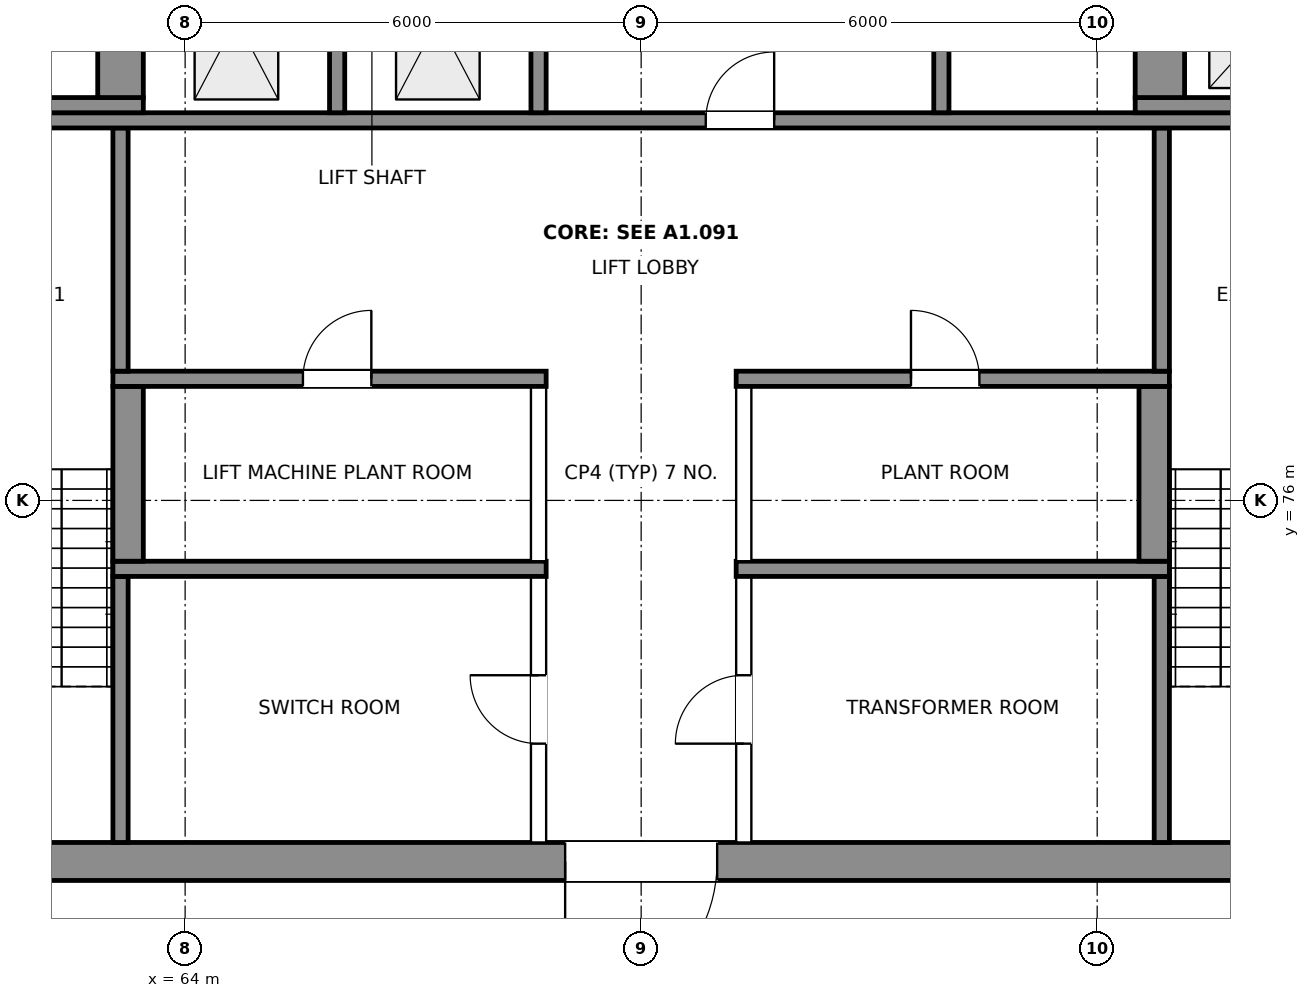
"""IFC4 building model, lengths in metres.
Left out: names, types, materials, properties, quantities, classifications, styles, units other than length and angle.
Written with IfcOpenShell. Run it as: python <this file> out.ifc"""

import sys

from ifc_helpers import new_model, si_unit, direction, frame, frame_2d, origin, place, context, subcontext, project, spatial, rectangle, extrude, element, fill, save


model = new_model("IFC4")
c1 = context("Model", 3, precision=1e-05, world=origin(), true_north=direction((0.0, 1.0)))
c2 = subcontext(c1, "Body", "Model", "MODEL_VIEW")
j1 = project(units=[si_unit("LENGTHUNIT", "METRE"), si_unit("PLANEANGLEUNIT", "RADIAN")], contexts=[c1])
p1 = place(None, origin())
s1 = spatial("IfcSite", under=j1, at=p1, CompositionType="ELEMENT")
p2 = place(p1, origin())
s2 = spatial("IfcBuilding", under=s1, at=p2, CompositionType="ELEMENT")
p3 = place(p2, frame((0.0, 0.0, 328.7)))
s3 = spatial("IfcBuildingStorey", under=s2, at=p3, CompositionType="ELEMENT", Elevation=328.7)
p4 = place(p3, frame((59.0, 71.25, 0.0), z_axis=(0.0, 0.0, 1.0), x_axis=(1.0, 0.0, 0.0)))
e1 = element("IfcWall", 1, at=p4, inside=s3, PredefinedType="SHEAR", context=c2, shape_type="SweptSolid", body=[
    extrude(rectangle(XDim=22.0, YDim=0.5, at=frame_2d((11.0, 0.0))), origin(), (0.0, 0.0, 1.0), 4.5),
])
p5 = place(p4, frame((2.025, 0.0, 0.0)))
e2 = element("IfcOpeningElement", 2, at=p5, cuts=e1, PredefinedType="OPENING", context=c2, shape_type="SweptSolid", body=[
    extrude(rectangle(XDim=1.2, YDim=2.1, at=frame_2d((0.6, 1.05))), frame((0.0, 0.26, 0.0), z_axis=(0.0, -1.0, 0.0), x_axis=(1.0, 0.0, 0.0)), (0.0, 0.0, 1.0), 0.52),
])
p6 = place(p4, frame((18.775, 0.0, 0.0)))
e3 = element("IfcOpeningElement", 3, at=p6, cuts=e1, PredefinedType="OPENING", context=c2, shape_type="SweptSolid", body=[
    extrude(rectangle(XDim=1.2, YDim=2.1, at=frame_2d((0.6, 1.05))), frame((0.0, 0.26, 0.0), z_axis=(0.0, -1.0, 0.0), x_axis=(1.0, 0.0, 0.0)), (0.0, 0.0, 1.0), 0.52),
])
p7 = place(p4, frame((10.0, 0.0, 0.0)))
e4 = element("IfcOpeningElement", 4, at=p7, cuts=e1, PredefinedType="OPENING", context=c2, shape_type="SweptSolid", body=[
    extrude(rectangle(XDim=2.0, YDim=2.1, at=frame_2d((1.0, 1.05))), frame((0.0, 0.26, 0.0), z_axis=(0.0, -1.0, 0.0), x_axis=(1.0, 0.0, 0.0)), (0.0, 0.0, 1.0), 0.52),
])
p8 = place(p3, frame((63.15, 71.5, 0.0), z_axis=(0.0, 0.0, 1.0), x_axis=(0.0, 1.0, 0.0)))
e5 = element("IfcWall", 5, at=p8, inside=s3, PredefinedType="SHEAR", context=c2, shape_type="SweptSolid", body=[
    extrude(rectangle(XDim=3.5, YDim=0.2, at=frame_2d((1.75, 0.0))), origin(), (0.0, 0.0, 1.0), 4.5),
])
p9 = place(p3, frame((68.65, 71.5, 0.0), z_axis=(0.0, 0.0, 1.0), x_axis=(0.0, 1.0, 0.0)))
e6 = element("IfcWall", 6, at=p9, inside=s3, PredefinedType="PARTITIONING", context=c2, shape_type="SweptSolid", body=[
    extrude(rectangle(XDim=3.5, YDim=0.2, at=frame_2d((1.75, 0.0))), origin(), (0.0, 0.0, 1.0), 4.2),
])
p10 = place(p9, frame((1.3, 0.0, 0.0)))
e7 = element("IfcOpeningElement", 7, at=p10, cuts=e6, PredefinedType="OPENING", context=c2, shape_type="SweptSolid", body=[
    extrude(rectangle(XDim=0.9, YDim=2.1, at=frame_2d((0.45, 1.05))), frame((0.0, 0.11, 0.0), z_axis=(0.0, -1.0, 0.0), x_axis=(1.0, 0.0, 0.0)), (0.0, 0.0, 1.0), 0.22),
])
p11 = place(p3, frame((71.35, 71.5, 0.0), z_axis=(0.0, 0.0, 1.0), x_axis=(0.0, 1.0, 0.0)))
e8 = element("IfcWall", 8, at=p11, inside=s3, PredefinedType="PARTITIONING", context=c2, shape_type="SweptSolid", body=[
    extrude(rectangle(XDim=3.5, YDim=0.2, at=frame_2d((1.75, 0.0))), origin(), (0.0, 0.0, 1.0), 4.2),
])
p12 = place(p11, frame((1.3, 0.0, 0.0)))
e9 = element("IfcOpeningElement", 9, at=p12, cuts=e8, PredefinedType="OPENING", context=c2, shape_type="SweptSolid", body=[
    extrude(rectangle(XDim=0.9, YDim=2.1, at=frame_2d((0.45, 1.05))), frame((0.0, 0.11, 0.0), z_axis=(0.0, -1.0, 0.0), x_axis=(1.0, 0.0, 0.0)), (0.0, 0.0, 1.0), 0.22),
])
p13 = place(p3, frame((76.85, 71.5, 0.0), z_axis=(0.0, 0.0, 1.0), x_axis=(0.0, 1.0, 0.0)))
e10 = element("IfcWall", 10, at=p13, inside=s3, PredefinedType="SHEAR", context=c2, shape_type="SweptSolid", body=[
    extrude(rectangle(XDim=3.5, YDim=0.2, at=frame_2d((1.75, 0.0))), origin(), (0.0, 0.0, 1.0), 4.5),
])
for number, where, z_axis, x_axis in (
    (11, (63.05, 75.1, 0.0), (0.0, 0.0, 1.0), (1.0, 0.0, 0.0)),
    (12, (71.25, 75.1, 0.0), (0.0, 0.0, 1.0), (1.0, 0.0, 0.0)),
):
    element("IfcWall", number, at=place(p3, frame(where, z_axis=z_axis, x_axis=x_axis)), inside=s3, PredefinedType="SHEAR", context=c2, shape_type="SweptSolid", body=[
        extrude(rectangle(XDim=5.7, YDim=0.2, at=frame_2d((2.85, 0.0))), origin(), (0.0, 0.0, 1.0), 4.5),
    ])
p14 = place(p3, frame((63.25, 75.2, 0.0), z_axis=(0.0, 0.0, 1.0), x_axis=(0.0, 1.0, 0.0)))
e13 = element("IfcWall", 13, at=p14, inside=s3, PredefinedType="SHEAR", context=c2, shape_type="SweptSolid", body=[
    extrude(rectangle(XDim=2.3, YDim=0.4, at=frame_2d((1.15, 0.0))), origin(), (0.0, 0.0, 1.0), 4.5),
])
for number, where, z_axis, x_axis in (
    (14, (68.65, 75.2, 0.0), (0.0, 0.0, 1.0), (0.0, 1.0, 0.0)),
    (15, (71.35, 75.2, 0.0), (0.0, 0.0, 1.0), (0.0, 1.0, 0.0)),
):
    element("IfcWall", number, at=place(p3, frame(where, z_axis=z_axis, x_axis=x_axis)), inside=s3, PredefinedType="PARTITIONING", context=c2, shape_type="SweptSolid", body=[
        extrude(rectangle(XDim=2.3, YDim=0.2, at=frame_2d((1.15, 0.0))), origin(), (0.0, 0.0, 1.0), 4.2),
    ])
p15 = place(p3, frame((76.75, 75.2, 0.0), z_axis=(0.0, 0.0, 1.0), x_axis=(0.0, 1.0, 0.0)))
e16 = element("IfcWall", 16, at=p15, inside=s3, PredefinedType="SHEAR", context=c2, shape_type="SweptSolid", body=[
    extrude(rectangle(XDim=2.3, YDim=0.4, at=frame_2d((1.15, 0.0))), origin(), (0.0, 0.0, 1.0), 4.5),
])
p16 = place(p3, frame((63.05, 77.6, 0.0), z_axis=(0.0, 0.0, 1.0), x_axis=(1.0, 0.0, 0.0)))
e17 = element("IfcWall", 17, at=p16, inside=s3, PredefinedType="SHEAR", context=c2, shape_type="SweptSolid", body=[
    extrude(rectangle(XDim=5.7, YDim=0.2, at=frame_2d((2.85, 0.0))), origin(), (0.0, 0.0, 1.0), 4.5),
])
p17 = place(p16, frame((2.5, 0.0, 0.0)))
e18 = element("IfcOpeningElement", 18, at=p17, cuts=e17, PredefinedType="OPENING", context=c2, shape_type="SweptSolid", body=[
    extrude(rectangle(XDim=0.9, YDim=2.1, at=frame_2d((0.45, 1.05))), frame((0.0, 0.11, 0.0), z_axis=(0.0, -1.0, 0.0), x_axis=(1.0, 0.0, 0.0)), (0.0, 0.0, 1.0), 0.22),
])
p18 = place(p3, frame((71.25, 77.6, 0.0), z_axis=(0.0, 0.0, 1.0), x_axis=(1.0, 0.0, 0.0)))
e19 = element("IfcWall", 19, at=p18, inside=s3, PredefinedType="SHEAR", context=c2, shape_type="SweptSolid", body=[
    extrude(rectangle(XDim=5.7, YDim=0.2, at=frame_2d((2.85, 0.0))), origin(), (0.0, 0.0, 1.0), 4.5),
])
p19 = place(p18, frame((2.3, 0.0, 0.0)))
e20 = element("IfcOpeningElement", 20, at=p19, cuts=e19, PredefinedType="OPENING", context=c2, shape_type="SweptSolid", body=[
    extrude(rectangle(XDim=0.9, YDim=2.1, at=frame_2d((0.45, 1.05))), frame((0.0, 0.11, 0.0), z_axis=(0.0, -1.0, 0.0), x_axis=(1.0, 0.0, 0.0)), (0.0, 0.0, 1.0), 0.22),
])
for number, where, z_axis, x_axis in (
    (21, (63.15, 77.7, 0.0), (0.0, 0.0, 1.0), (0.0, 1.0, 0.0)),
    (22, (76.85, 77.7, 0.0), (0.0, 0.0, 1.0), (0.0, 1.0, 0.0)),
):
    element("IfcWall", number, at=place(p3, frame(where, z_axis=z_axis, x_axis=x_axis)), inside=s3, PredefinedType="SHEAR", context=c2, shape_type="SweptSolid", body=[
        extrude(rectangle(XDim=3.2, YDim=0.2, at=frame_2d((1.6, 0.0))), origin(), (0.0, 0.0, 1.0), 4.5),
    ])
p20 = place(p3, frame((59.0, 81.0, 0.0), z_axis=(0.0, 0.0, 1.0), x_axis=(1.0, 0.0, 0.0)))
e23 = element("IfcWall", 23, at=p20, inside=s3, PredefinedType="SHEAR", context=c2, shape_type="SweptSolid", body=[
    extrude(rectangle(XDim=22.0, YDim=0.2, at=frame_2d((11.0, 0.0))), origin(), (0.0, 0.0, 1.0), 4.5),
])
p21 = place(p20, frame((11.85, 0.0, 0.0)))
e24 = element("IfcOpeningElement", 24, at=p21, cuts=e23, PredefinedType="OPENING", context=c2, shape_type="SweptSolid", body=[
    extrude(rectangle(XDim=0.9, YDim=2.1, at=frame_2d((0.45, 1.05))), frame((0.0, 0.11, 0.0), z_axis=(0.0, -1.0, 0.0), x_axis=(1.0, 0.0, 0.0)), (0.0, 0.0, 1.0), 0.22),
])
p22 = place(p3, frame((59.0, 81.2, 0.0), z_axis=(0.0, 0.0, 1.0), x_axis=(1.0, 0.0, 0.0)))
e25 = element("IfcWall", 25, at=p22, inside=s3, PredefinedType="SHEAR", context=c2, shape_type="SweptSolid", body=[
    extrude(rectangle(XDim=4.45, YDim=0.2, at=frame_2d((2.225, 0.0))), origin(), (0.0, 0.0, 1.0), 4.5),
])
for number, where, z_axis, x_axis in (
    (26, (66.0, 81.1, 0.0), (0.0, 0.0, 1.0), (0.0, 1.0, 0.0)),
    (27, (68.65, 81.1, 0.0), (0.0, 0.0, 1.0), (0.0, 1.0, 0.0)),
    (28, (73.95, 81.1, 0.0), (0.0, 0.0, 1.0), (0.0, 1.0, 0.0)),
):
    element("IfcWall", number, at=place(p3, frame(where, z_axis=z_axis, x_axis=x_axis)), inside=s3, PredefinedType="SHEAR", context=c2, shape_type="SweptSolid", body=[
        extrude(rectangle(XDim=2.45, YDim=0.2, at=frame_2d((1.225, 0.0))), origin(), (0.0, 0.0, 1.0), 4.5),
    ])
p23 = place(p3, frame((76.5, 81.2, 0.0), z_axis=(0.0, 0.0, 1.0), x_axis=(1.0, 0.0, 0.0)))
e29 = element("IfcWall", 29, at=p23, inside=s3, PredefinedType="SHEAR", context=c2, shape_type="SweptSolid", body=[
    extrude(rectangle(XDim=4.5, YDim=0.2, at=frame_2d((2.25, 0.0))), origin(), (0.0, 0.0, 1.0), 4.5),
])
p24 = place(p3, frame((63.15, 81.3, 0.0), z_axis=(0.0, 0.0, 1.0), x_axis=(0.0, 1.0, 0.0)))
e30 = element("IfcWall", 30, at=p24, inside=s3, PredefinedType="SHEAR", context=c2, shape_type="SweptSolid", body=[
    extrude(rectangle(XDim=2.25, YDim=0.6, at=frame_2d((1.125, 0.0))), origin(), (0.0, 0.0, 1.0), 4.5),
])
p25 = place(p3, frame((76.825, 81.3, 0.0), z_axis=(0.0, 0.0, 1.0), x_axis=(0.0, 1.0, 0.0)))
e31 = element("IfcWall", 31, at=p25, inside=s3, PredefinedType="SHEAR", context=c2, shape_type="SweptSolid", body=[
    extrude(rectangle(XDim=2.25, YDim=0.65, at=frame_2d((1.125, 0.0))), origin(), (0.0, 0.0, 1.0), 4.5),
])
p26 = place(p7, frame((2.0, 0.0, 0.0), z_axis=(0.0, 0.0, 1.0), x_axis=(-1.0, 0.0, 0.0)))
e32 = element("IfcDoor", 32, at=p26, inside=s3, OperationType="DOUBLE_DOOR_SINGLE_SWING", PredefinedType="DOOR", context=c2, shape_type="SweptSolid", body=[
    extrude(rectangle(XDim=2.0, YDim=2.1, at=frame_2d((1.0, 1.05))), frame((0.0, 0.025, 0.0), z_axis=(0.0, -1.0, 0.0), x_axis=(1.0, 0.0, 0.0)), (0.0, 0.0, 1.0), 0.05),
])
fill(e4, e32)
p27 = place(p10, origin())
e33 = element("IfcDoor", 33, at=p27, inside=s3, OperationType="SINGLE_SWING_RIGHT", PredefinedType="DOOR", context=c2, shape_type="SweptSolid", body=[
    extrude(rectangle(XDim=0.9, YDim=2.1, at=frame_2d((0.45, 1.05))), frame((0.0, 0.025, 0.0), z_axis=(0.0, -1.0, 0.0), x_axis=(1.0, 0.0, 0.0)), (0.0, 0.0, 1.0), 0.05),
])
fill(e7, e33)
p28 = place(p12, origin())
e34 = element("IfcDoor", 34, at=p28, inside=s3, OperationType="SINGLE_SWING_LEFT", PredefinedType="DOOR", context=c2, shape_type="SweptSolid", body=[
    extrude(rectangle(XDim=0.9, YDim=2.1, at=frame_2d((0.45, 1.05))), frame((0.0, 0.025, 0.0), z_axis=(0.0, -1.0, 0.0), x_axis=(1.0, 0.0, 0.0)), (0.0, 0.0, 1.0), 0.05),
])
fill(e9, e34)
p29 = place(p17, origin())
e35 = element("IfcDoor", 35, at=p29, inside=s3, OperationType="SINGLE_SWING_RIGHT", PredefinedType="DOOR", context=c2, shape_type="SweptSolid", body=[
    extrude(rectangle(XDim=0.9, YDim=2.1, at=frame_2d((0.45, 1.05))), frame((0.0, 0.025, 0.0), z_axis=(0.0, -1.0, 0.0), x_axis=(1.0, 0.0, 0.0)), (0.0, 0.0, 1.0), 0.05),
])
fill(e18, e35)
p30 = place(p19, origin())
e36 = element("IfcDoor", 36, at=p30, inside=s3, OperationType="SINGLE_SWING_LEFT", PredefinedType="DOOR", context=c2, shape_type="SweptSolid", body=[
    extrude(rectangle(XDim=0.9, YDim=2.1, at=frame_2d((0.45, 1.05))), frame((0.0, 0.025, 0.0), z_axis=(0.0, -1.0, 0.0), x_axis=(1.0, 0.0, 0.0)), (0.0, 0.0, 1.0), 0.05),
])
fill(e20, e36)
p31 = place(p21, origin())
e37 = element("IfcDoor", 37, at=p31, inside=s3, OperationType="SINGLE_SWING_RIGHT", PredefinedType="DOOR", context=c2, shape_type="SweptSolid", body=[
    extrude(rectangle(XDim=0.9, YDim=2.1, at=frame_2d((0.45, 1.05))), frame((0.0, 0.025, 0.0), z_axis=(0.0, -1.0, 0.0), x_axis=(1.0, 0.0, 0.0)), (0.0, 0.0, 1.0), 0.05),
])
fill(e24, e37)
save(model, sys.argv[1])
